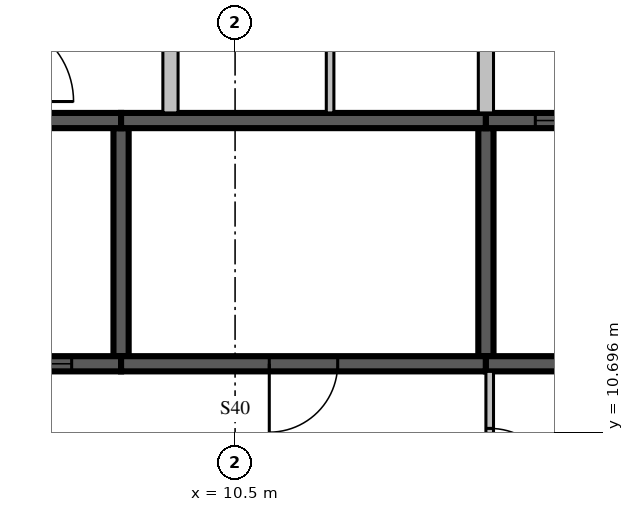
"""IFC4 building model, lengths in metres.
Left out: names, types, materials, properties, quantities, classifications, styles, units other than length and angle.
Written with IfcOpenShell. Run it as: python <this file> out.ifc"""

import sys

from ifc_helpers import new_model, si_unit, direction, frame, frame_2d, origin, place, context, subcontext, project, spatial, rectangle, extrude, source, transform, mapped, element, fill, save


model = new_model("IFC4")
c1 = context("Model", 3, precision=1e-05, world=origin(), true_north=direction((0.0, 1.0)))
c2 = subcontext(c1, "Body", "Model", "MODEL_VIEW")
j1 = project(units=[si_unit("LENGTHUNIT", "METRE"), si_unit("PLANEANGLEUNIT", "RADIAN")], contexts=[c1])
p1 = place(None, origin())
s1 = spatial("IfcSite", under=j1, at=p1, CompositionType="ELEMENT")
p2 = place(p1, origin())
s2 = spatial("IfcBuilding", under=s1, at=p2, CompositionType="ELEMENT")
p3 = place(p2, frame((0.0, 0.0, 309.0)))
s3 = spatial("IfcBuildingStorey", under=s2, at=p3, CompositionType="ELEMENT", Elevation=309.0)
m1 = source(origin(), c2, "Body", "SweptSolid", [
    extrude(rectangle(XDim=3.0, YDim=0.2, at=frame_2d((1.5, 0.0))), origin(), (0.0, 0.0, 1.0), 3.1),
])
for number, where, z_axis, x_axis in (
    (1, (9.0, 11.7, 0.0), (0.0, 0.0, 1.0), (0.0, 1.0, 0.0)),
    (2, (13.8, 11.7, 0.0), (0.0, 0.0, 1.0), (0.0, 1.0, 0.0)),
):
    element("IfcWall", number, at=place(p3, frame(where, z_axis=z_axis, x_axis=x_axis)), inside=s3, PredefinedType="SOLIDWALL", context=c2, shape_type="MappedRepresentation", body=[
        mapped(m1, transform((0.0, 0.0, 0.0), scale=1.0)),
    ])
m2 = source(origin(), c2, "Body", "SweptSolid", [
    extrude(rectangle(XDim=4.8, YDim=0.2, at=frame_2d((2.4, 0.0))), origin(), (0.0, 0.0, 1.0), 3.5),
])
p4 = place(p3, frame((4.2, 11.6, 0.0), z_axis=(0.0, 0.0, 1.0), x_axis=(1.0, 0.0, 0.0)))
e3 = element("IfcWall", 3, at=p4, inside=s3, PredefinedType="SOLIDWALL", context=c2, shape_type="MappedRepresentation", body=[
    mapped(m2, transform((0.0, 0.0, 0.0), scale=1.0)),
])
m3 = source(origin(), c2, "Body", "SweptSolid", [
    extrude(rectangle(XDim=1.1, YDim=2.1, at=frame_2d((0.55, 1.05))), frame((0.0, 0.11, 0.0), z_axis=(0.0, -1.0, 0.0), x_axis=(1.0, 0.0, 0.0)), (0.0, 0.0, 1.0), 0.22),
])
p5 = place(p4, frame((0.65, 0.0, 0.0)))
e4 = element("IfcOpeningElement", 4, at=p5, cuts=e3, PredefinedType="OPENING", context=c2, shape_type="MappedRepresentation", body=[
    mapped(m3, transform((0.0, 0.0, 0.0), scale=1.0)),
])
p6 = place(p4, frame((3.05, 0.0, 0.0)))
e5 = element("IfcOpeningElement", 5, at=p6, cuts=e3, PredefinedType="OPENING", context=c2, shape_type="MappedRepresentation", body=[
    mapped(m3, transform((0.0, 0.0, 0.0), scale=1.0)),
])
m4 = source(origin(), c2, "Body", "SweptSolid", [
    extrude(rectangle(XDim=4.8, YDim=0.2, at=frame_2d((2.4, 0.0))), origin(), (0.0, 0.0, 1.0), 3.1),
])
p7 = place(p3, frame((9.0, 11.6, 0.0), z_axis=(0.0, 0.0, 1.0), x_axis=(1.0, 0.0, 0.0)))
e6 = element("IfcWall", 6, at=p7, inside=s3, PredefinedType="SOLIDWALL", context=c2, shape_type="MappedRepresentation", body=[
    mapped(m4, transform((0.0, 0.0, 0.0), scale=1.0)),
])
m5 = source(origin(), c2, "Body", "SweptSolid", [
    extrude(rectangle(XDim=0.9, YDim=2.1, at=frame_2d((0.45, 1.05))), frame((0.0, 0.11, 0.0), z_axis=(0.0, -1.0, 0.0), x_axis=(1.0, 0.0, 0.0)), (0.0, 0.0, 1.0), 0.22),
])
p8 = place(p7, frame((1.95, 0.0, 0.0)))
e7 = element("IfcOpeningElement", 7, at=p8, cuts=e6, PredefinedType="OPENING", context=c2, shape_type="MappedRepresentation", body=[
    mapped(m5, transform((0.0, 0.0, 0.0), scale=1.0)),
])
m6 = source(origin(), c2, "Body", "SweptSolid", [
    extrude(rectangle(XDim=7.2, YDim=0.2, at=frame_2d((3.6, 0.0))), origin(), (0.0, 0.0, 1.0), 3.5),
])
p9 = place(p3, frame((13.8, 11.6, 0.0), z_axis=(0.0, 0.0, 1.0), x_axis=(1.0, 0.0, 0.0)))
e8 = element("IfcWall", 8, at=p9, inside=s3, PredefinedType="SOLIDWALL", context=c2, shape_type="MappedRepresentation", body=[
    mapped(m6, transform((0.0, 0.0, 0.0), scale=1.0)),
])
p10 = place(p3, frame((4.2, 14.8, 0.0), z_axis=(0.0, 0.0, 1.0), x_axis=(1.0, 0.0, 0.0)))
e9 = element("IfcWall", 9, at=p10, inside=s3, PredefinedType="SOLIDWALL", context=c2, shape_type="MappedRepresentation", body=[
    mapped(m2, transform((0.0, 0.0, 0.0), scale=1.0)),
])
p11 = place(p3, frame((9.0, 14.8, 0.0), z_axis=(0.0, 0.0, 1.0), x_axis=(1.0, 0.0, 0.0)))
e10 = element("IfcWall", 10, at=p11, inside=s3, PredefinedType="SOLIDWALL", context=c2, shape_type="MappedRepresentation", body=[
    mapped(m4, transform((0.0, 0.0, 0.0), scale=1.0)),
])
p12 = place(p3, frame((13.8, 14.8, 0.0), z_axis=(0.0, 0.0, 1.0), x_axis=(1.0, 0.0, 0.0)))
e11 = element("IfcWall", 11, at=p12, inside=s3, PredefinedType="SOLIDWALL", context=c2, shape_type="MappedRepresentation", body=[
    mapped(m6, transform((0.0, 0.0, 0.0), scale=1.0)),
])
p13 = place(p12, frame((0.65, 0.0, 0.0)))
e12 = element("IfcOpeningElement", 12, at=p13, cuts=e11, PredefinedType="OPENING", context=c2, shape_type="MappedRepresentation", body=[
    mapped(m3, transform((0.0, 0.0, 0.0), scale=1.0)),
])
p14 = place(p12, frame((3.05, 0.0, 0.0)))
e13 = element("IfcOpeningElement", 13, at=p14, cuts=e11, PredefinedType="OPENING", context=c2, shape_type="MappedRepresentation", body=[
    mapped(m3, transform((0.0, 0.0, 0.0), scale=1.0)),
])
p15 = place(p12, frame((5.45, 0.0, 0.0)))
e14 = element("IfcOpeningElement", 14, at=p15, cuts=e11, PredefinedType="OPENING", context=c2, shape_type="MappedRepresentation", body=[
    mapped(m3, transform((0.0, 0.0, 0.0), scale=1.0)),
])
m7 = source(origin(), c2, "Body", "SweptSolid", [
    extrude(rectangle(XDim=3.0, YDim=0.2, at=frame_2d((1.5, 0.0))), origin(), (0.0, 0.0, 1.0), 3.1),
])
p16 = place(p3, frame((9.65, 14.9, 0.0), z_axis=(0.0, 0.0, 1.0), x_axis=(0.0, 1.0, 0.0)))
e15 = element("IfcWall", 15, at=p16, inside=s3, PredefinedType="PARTITIONING", context=c2, shape_type="MappedRepresentation", body=[
    mapped(m7, transform((0.0, 0.0, 0.0), scale=1.0)),
])
m8 = source(origin(), c2, "Body", "SweptSolid", [
    extrude(rectangle(XDim=2.5, YDim=0.1, at=frame_2d((1.25, 0.0))), origin(), (0.0, 0.0, 1.0), 3.1),
])
p17 = place(p3, frame((13.85, 9.0, 0.0), z_axis=(0.0, 0.0, 1.0), x_axis=(0.0, 1.0, 0.0)))
e16 = element("IfcWall", 16, at=p17, inside=s3, PredefinedType="PARTITIONING", context=c2, shape_type="MappedRepresentation", body=[
    mapped(m8, transform((0.0, 0.0, 0.0), scale=1.0)),
])
m9 = source(origin(), c2, "Body", "SweptSolid", [
    extrude(rectangle(XDim=0.9, YDim=2.1, at=frame_2d((0.45, 1.05))), frame((0.0, 0.06, 0.0), z_axis=(0.0, -1.0, 0.0), x_axis=(1.0, 0.0, 0.0)), (0.0, 0.0, 1.0), 0.12),
])
p18 = place(p17, frame((0.85, 0.0, 0.0)))
e17 = element("IfcOpeningElement", 17, at=p18, cuts=e16, PredefinedType="OPENING", context=c2, shape_type="MappedRepresentation", body=[
    mapped(m9, transform((0.0, 0.0, 0.0), scale=1.0)),
])
p19 = place(p3, frame((13.8, 14.9, 0.0), z_axis=(0.0, 0.0, 1.0), x_axis=(0.0, 1.0, 0.0)))
e18 = element("IfcWall", 18, at=p19, inside=s3, PredefinedType="PARTITIONING", context=c2, shape_type="MappedRepresentation", body=[
    mapped(m7, transform((0.0, 0.0, 0.0), scale=1.0)),
])
m10 = source(origin(), c2, "Body", "SweptSolid", [
    extrude(rectangle(XDim=3.0, YDim=0.1, at=frame_2d((1.5, 0.0))), origin(), (0.0, 0.0, 1.0), 3.1),
])
p20 = place(p3, frame((11.75, 14.9, 0.0), z_axis=(0.0, 0.0, 1.0), x_axis=(0.0, 1.0, 0.0)))
e19 = element("IfcWall", 19, at=p20, inside=s3, PredefinedType="PARTITIONING", context=c2, shape_type="MappedRepresentation", body=[
    mapped(m10, transform((0.0, 0.0, 0.0), scale=1.0)),
])
m11 = source(origin(), c2, "Body", "SweptSolid", [
    extrude(rectangle(XDim=1.1, YDim=2.1, at=frame_2d((0.55, 1.05))), frame((0.0, 0.025, 0.0), z_axis=(0.0, -1.0, 0.0), x_axis=(1.0, 0.0, 0.0)), (0.0, 0.0, 1.0), 0.05),
])
p21 = place(p6, origin())
e20 = element("IfcDoor", 20, at=p21, inside=s3, OperationType="SLIDING_TO_LEFT", PredefinedType="DOOR", context=c2, shape_type="MappedRepresentation", body=[
    mapped(m11, transform((0.0, 0.0, 0.0), scale=1.0)),
])
fill(e5, e20)
m12 = source(origin(), c2, "Body", "SweptSolid", [
    extrude(rectangle(XDim=0.9, YDim=2.1, at=frame_2d((0.45, 1.05))), frame((0.0, 0.025, 0.0), z_axis=(0.0, -1.0, 0.0), x_axis=(1.0, 0.0, 0.0)), (0.0, 0.0, 1.0), 0.05),
])
p22 = place(p8, origin())
e21 = element("IfcDoor", 21, at=p22, inside=s3, OperationType="SINGLE_SWING_RIGHT", PredefinedType="DOOR", context=c2, shape_type="MappedRepresentation", body=[
    mapped(m12, transform((0.0, 0.0, 0.0), scale=1.0)),
])
fill(e7, e21)
p23 = place(p13, origin())
e22 = element("IfcDoor", 22, at=p23, inside=s3, OperationType="SLIDING_TO_LEFT", PredefinedType="DOOR", context=c2, shape_type="MappedRepresentation", body=[
    mapped(m11, transform((0.0, 0.0, 0.0), scale=1.0)),
])
fill(e12, e22)
p24 = place(p18, origin())
e23 = element("IfcDoor", 23, at=p24, inside=s3, OperationType="SINGLE_SWING_RIGHT", PredefinedType="DOOR", context=c2, shape_type="MappedRepresentation", body=[
    mapped(m12, transform((0.0, 0.0, 0.0), scale=1.0)),
])
fill(e17, e23)
save(model, sys.argv[1])
